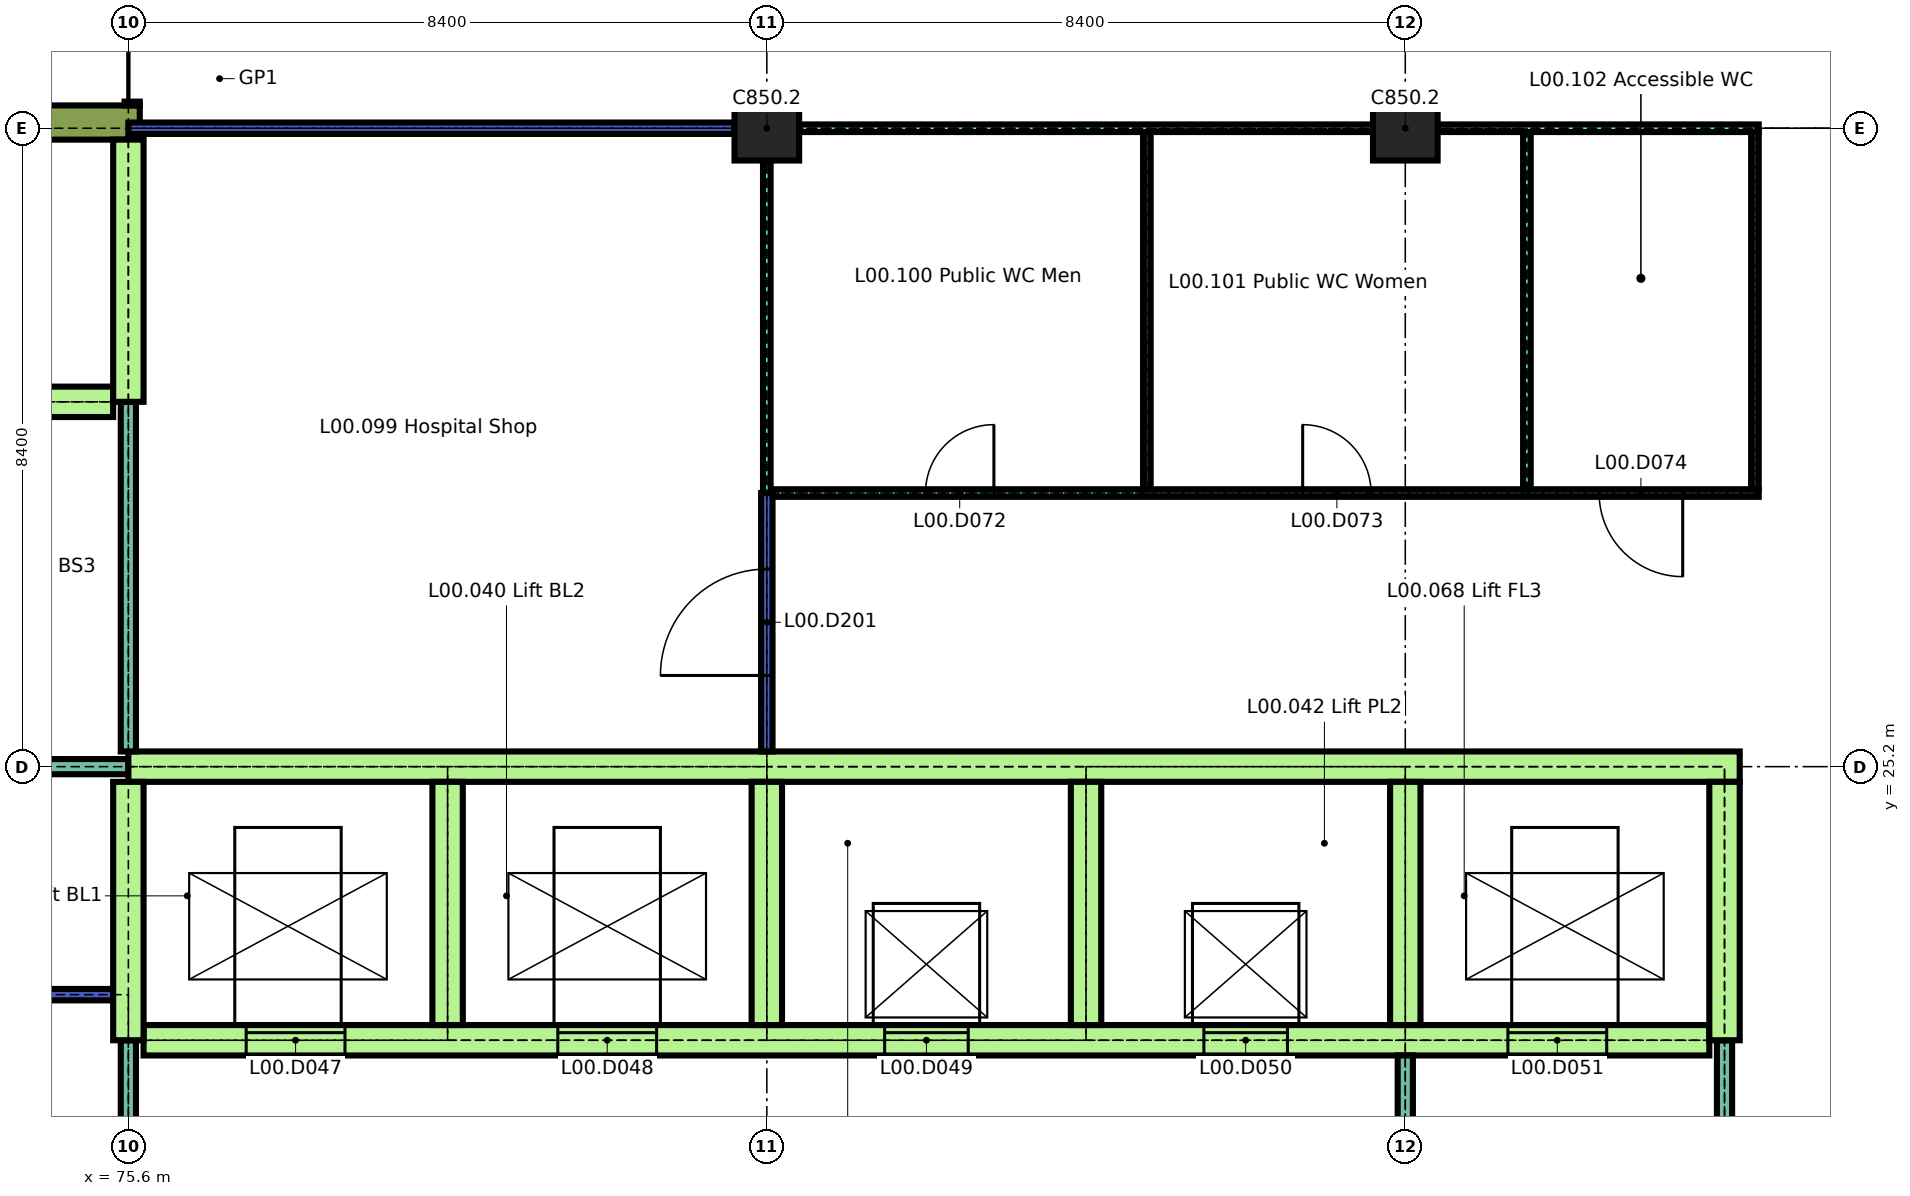
"""IFC4 building model, lengths in metres.
Left out: names, types, materials, properties, quantities, classifications, styles, units other than length and angle.
Written with IfcOpenShell. Run it as: python <this file> out.ifc"""

import sys

from ifc_helpers import new_model, si_unit, direction, frame, frame_2d, origin, origin_2d, place, context, subcontext, project, spatial, rectangle, extrude, element, fill, save


model = new_model("IFC4")
c1 = context("Model", 3, precision=1e-05, world=origin(), true_north=direction((0.0, 1.0)))
c2 = subcontext(c1, "Body", "Model", "MODEL_VIEW")
j1 = project(units=[si_unit("LENGTHUNIT", "METRE"), si_unit("PLANEANGLEUNIT", "RADIAN")], contexts=[c1])
p1 = place(None, origin())
s1 = spatial("IfcSite", under=j1, at=p1, CompositionType="ELEMENT")
p2 = place(p1, origin())
s2 = spatial("IfcBuilding", under=s1, at=p2, CompositionType="ELEMENT")
p3 = place(p2, origin())
s3 = spatial("IfcBuildingStorey", under=s2, at=p3, CompositionType="ELEMENT", Elevation=0.0)
for number, where, z_axis, x_axis in (
    (1, (84.0, 33.6, 0.0), (0.0, 0.0, 1.0), (1.0, 0.0, 0.0)),
    (2, (92.4, 33.6, 0.0), (0.0, 0.0, 1.0), (1.0, 0.0, 0.0)),
):
    element("IfcColumn", number, at=place(p3, frame(where, z_axis=z_axis, x_axis=x_axis)), inside=s3, PredefinedType="COLUMN", context=c2, shape_type="SweptSolid", body=[
        extrude(rectangle(XDim=0.85, YDim=0.85, at=origin_2d()), origin(), (0.0, 0.0, 1.0), 4.14),
    ])
p4 = place(p3, frame((72.3, 33.675, 0.0), z_axis=(0.0, 0.0, 1.0), x_axis=(1.0, 0.0, 0.0)))
e3 = element("IfcWall", 3, at=p4, inside=s3, PredefinedType="SOLIDWALL", context=c2, shape_type="SweptSolid", body=[
    extrude(rectangle(XDim=3.45, YDim=0.45, at=frame_2d((1.725, 0.0))), origin(), (0.0, 0.0, 1.0), 4.14),
])
p5 = place(p3, frame((75.65, 33.9, 0.0), z_axis=(0.0, 0.0, 1.0), x_axis=(0.0, 1.0, 0.0)))
e4 = element("IfcWall", 4, at=p5, inside=s3, PredefinedType="SOLIDWALL", context=c2, shape_type="SweptSolid", body=[
    extrude(rectangle(XDim=0.05, YDim=0.2, at=frame_2d((0.025, 0.0))), origin(), (0.0, 0.0, 1.0), 3.164),
])
p6 = place(p3, frame((75.8, 21.6, 0.0), z_axis=(0.0, 0.0, 1.0), x_axis=(1.0, 0.0, 0.0)))
e5 = element("IfcWall", 5, at=p6, inside=s3, PredefinedType="SHEAR", context=c2, shape_type="SweptSolid", body=[
    extrude(rectangle(XDim=20.6, YDim=0.4, at=frame_2d((10.3, 0.0))), origin(), (0.0, 0.0, 1.0), 4.14),
])
p7 = place(p6, frame((1.35, 0.0, 0.0)))
e6 = element("IfcOpeningElement", 6, at=p7, cuts=e5, PredefinedType="OPENING", context=c2, shape_type="SweptSolid", body=[
    extrude(rectangle(XDim=1.3, YDim=2.1, at=frame_2d((0.65, 1.05))), frame((0.0, 0.21, 0.0), z_axis=(0.0, -1.0, 0.0), x_axis=(1.0, 0.0, 0.0)), (0.0, 0.0, 1.0), 0.42),
])
p8 = place(p6, frame((5.45, 0.0, 0.0)))
e7 = element("IfcOpeningElement", 7, at=p8, cuts=e5, PredefinedType="OPENING", context=c2, shape_type="SweptSolid", body=[
    extrude(rectangle(XDim=1.3, YDim=2.1, at=frame_2d((0.65, 1.05))), frame((0.0, 0.21, 0.0), z_axis=(0.0, -1.0, 0.0), x_axis=(1.0, 0.0, 0.0)), (0.0, 0.0, 1.0), 0.42),
])
p9 = place(p6, frame((9.75, 0.0, 0.0)))
e8 = element("IfcOpeningElement", 8, at=p9, cuts=e5, PredefinedType="OPENING", context=c2, shape_type="SweptSolid", body=[
    extrude(rectangle(XDim=1.1, YDim=2.1, at=frame_2d((0.55, 1.05))), frame((0.0, 0.21, 0.0), z_axis=(0.0, -1.0, 0.0), x_axis=(1.0, 0.0, 0.0)), (0.0, 0.0, 1.0), 0.42),
])
p10 = place(p6, frame((13.95, 0.0, 0.0)))
e9 = element("IfcOpeningElement", 9, at=p10, cuts=e5, PredefinedType="OPENING", context=c2, shape_type="SweptSolid", body=[
    extrude(rectangle(XDim=1.1, YDim=2.1, at=frame_2d((0.55, 1.05))), frame((0.0, 0.21, 0.0), z_axis=(0.0, -1.0, 0.0), x_axis=(1.0, 0.0, 0.0)), (0.0, 0.0, 1.0), 0.42),
])
p11 = place(p6, frame((17.95, 0.0, 0.0)))
e10 = element("IfcOpeningElement", 10, at=p11, cuts=e5, PredefinedType="OPENING", context=c2, shape_type="SweptSolid", body=[
    extrude(rectangle(XDim=1.3, YDim=2.1, at=frame_2d((0.65, 1.05))), frame((0.0, 0.21, 0.0), z_axis=(0.0, -1.0, 0.0), x_axis=(1.0, 0.0, 0.0)), (0.0, 0.0, 1.0), 0.42),
])
p12 = place(p3, frame((63.0, 22.2, 0.0), z_axis=(0.0, 0.0, 1.0), x_axis=(1.0, 0.0, 0.0)))
e11 = element("IfcWall", 11, at=p12, inside=s3, PredefinedType="PARTITIONING", context=c2, shape_type="SweptSolid", body=[
    extrude(rectangle(XDim=12.4, YDim=0.15, at=frame_2d((6.2, 0.0))), origin(), (0.0, 0.0, 1.0), 4.14),
])
p13 = place(p3, frame((67.2, 25.2, 0.0), z_axis=(0.0, 0.0, 1.0), x_axis=(1.0, 0.0, 0.0)))
e12 = element("IfcWall", 12, at=p13, inside=s3, PredefinedType="PARTITIONING", context=c2, shape_type="SweptSolid", body=[
    extrude(rectangle(XDim=8.4, YDim=0.2, at=frame_2d((4.2, 0.0))), origin(), (0.0, 0.0, 1.0), 4.14),
])
p14 = place(p13, frame((3.5, 0.0, 0.0)))
e13 = element("IfcOpeningElement", 13, at=p14, cuts=e12, PredefinedType="OPENING", context=c2, shape_type="SweptSolid", body=[
    extrude(rectangle(XDim=1.4, YDim=2.1, at=frame_2d((0.7, 1.05))), frame((0.0, 0.11, 0.0), z_axis=(0.0, -1.0, 0.0), x_axis=(1.0, 0.0, 0.0)), (0.0, 0.0, 1.0), 0.22),
])
p15 = place(p3, frame((75.6, 25.2, 0.0), z_axis=(0.0, 0.0, 1.0), x_axis=(1.0, 0.0, 0.0)))
e14 = element("IfcWall", 14, at=p15, inside=s3, PredefinedType="SHEAR", context=c2, shape_type="SweptSolid", body=[
    extrude(rectangle(XDim=21.2, YDim=0.4, at=frame_2d((10.6, 0.0))), origin(), (0.0, 0.0, 1.0), 4.14),
])
p16 = place(p3, frame((84.075, 28.8, 0.0), z_axis=(0.0, 0.0, 1.0), x_axis=(1.0, 0.0, 0.0)))
e15 = element("IfcWall", 15, at=p16, inside=s3, PredefinedType="PARTITIONING", context=c2, shape_type="SweptSolid", body=[
    extrude(rectangle(XDim=12.975, YDim=0.1, at=frame_2d((6.488, 0.0))), origin(), (0.0, 0.0, 1.0), 4.14),
])
p17 = place(p16, frame((2.012, 0.0, 0.0)))
e16 = element("IfcOpeningElement", 16, at=p17, cuts=e15, PredefinedType="OPENING", context=c2, shape_type="SweptSolid", body=[
    extrude(rectangle(XDim=0.9, YDim=2.1, at=frame_2d((0.45, 1.05))), frame((0.0, 0.06, 0.0), z_axis=(0.0, -1.0, 0.0), x_axis=(1.0, 0.0, 0.0)), (0.0, 0.0, 1.0), 0.12),
])
p18 = place(p16, frame((6.975, 0.0, 0.0)))
e17 = element("IfcOpeningElement", 17, at=p18, cuts=e15, PredefinedType="OPENING", context=c2, shape_type="SweptSolid", body=[
    extrude(rectangle(XDim=0.9, YDim=2.1, at=frame_2d((0.45, 1.05))), frame((0.0, 0.06, 0.0), z_axis=(0.0, -1.0, 0.0), x_axis=(1.0, 0.0, 0.0)), (0.0, 0.0, 1.0), 0.12),
])
p19 = place(p16, frame((10.875, 0.0, 0.0)))
e18 = element("IfcOpeningElement", 18, at=p19, cuts=e15, PredefinedType="OPENING", context=c2, shape_type="SweptSolid", body=[
    extrude(rectangle(XDim=1.1, YDim=2.1, at=frame_2d((0.55, 1.05))), frame((0.0, 0.06, 0.0), z_axis=(0.0, -1.0, 0.0), x_axis=(1.0, 0.0, 0.0)), (0.0, 0.0, 1.0), 0.12),
])
p20 = place(p3, frame((67.4, 30.0, 0.0), z_axis=(0.0, 0.0, 1.0), x_axis=(1.0, 0.0, 0.0)))
e19 = element("IfcWall", 19, at=p20, inside=s3, PredefinedType="SHEAR", context=c2, shape_type="SweptSolid", body=[
    extrude(rectangle(XDim=8.0, YDim=0.4, at=frame_2d((4.0, 0.0))), origin(), (0.0, 0.0, 1.0), 4.14),
])
p21 = place(p20, frame((0.4, 0.0, 0.0)))
e20 = element("IfcOpeningElement", 20, at=p21, cuts=e19, PredefinedType="OPENING", context=c2, shape_type="SweptSolid", body=[
    extrude(rectangle(XDim=1.2, YDim=2.1, at=frame_2d((0.6, 1.05))), frame((0.0, 0.21, 0.0), z_axis=(0.0, -1.0, 0.0), x_axis=(1.0, 0.0, 0.0)), (0.0, 0.0, 1.0), 0.42),
])
p22 = place(p3, frame((75.6, 33.6, 0.0), z_axis=(0.0, 0.0, 1.0), x_axis=(1.0, 0.0, 0.0)))
e21 = element("IfcWall", 21, at=p22, inside=s3, PredefinedType="PARTITIONING", context=c2, shape_type="SweptSolid", body=[
    extrude(rectangle(XDim=7.975, YDim=0.15, at=frame_2d((3.987, 0.0))), origin(), (0.0, 0.0, 1.0), 4.14),
])
p23 = place(p3, frame((84.425, 33.6, 0.0), z_axis=(0.0, 0.0, 1.0), x_axis=(1.0, 0.0, 0.0)))
e22 = element("IfcWall", 22, at=p23, inside=s3, PredefinedType="PARTITIONING", context=c2, shape_type="SweptSolid", body=[
    extrude(rectangle(XDim=7.55, YDim=0.1, at=frame_2d((3.775, 0.0))), origin(), (0.0, 0.0, 1.0), 4.14),
])
p24 = place(p3, frame((92.825, 33.6, 0.0), z_axis=(0.0, 0.0, 1.0), x_axis=(1.0, 0.0, 0.0)))
e23 = element("IfcWall", 23, at=p24, inside=s3, PredefinedType="PARTITIONING", context=c2, shape_type="SweptSolid", body=[
    extrude(rectangle(XDim=4.225, YDim=0.1, at=frame_2d((2.113, 0.0))), origin(), (0.0, 0.0, 1.0), 4.14),
])
p25 = place(p3, frame((75.6, 16.9, 0.0), z_axis=(0.0, 0.0, 1.0), x_axis=(0.0, 1.0, 0.0)))
e24 = element("IfcWall", 24, at=p25, inside=s3, PredefinedType="PARTITIONING", context=c2, shape_type="SweptSolid", body=[
    extrude(rectangle(XDim=4.7, YDim=0.2, at=frame_2d((2.35, 0.0))), origin(), (0.0, 0.0, 1.0), 4.14),
])
p26 = place(p3, frame((75.6, 21.6, 0.0), z_axis=(0.0, 0.0, 1.0), x_axis=(0.0, 1.0, 0.0)))
e25 = element("IfcWall", 25, at=p26, inside=s3, PredefinedType="SHEAR", context=c2, shape_type="SweptSolid", body=[
    extrude(rectangle(XDim=3.4, YDim=0.4, at=frame_2d((1.7, 0.0))), origin(), (0.0, 0.0, 1.0), 4.14),
])
p27 = place(p3, frame((75.6, 25.4, 0.0), z_axis=(0.0, 0.0, 1.0), x_axis=(0.0, 1.0, 0.0)))
e26 = element("IfcWall", 26, at=p27, inside=s3, PredefinedType="PARTITIONING", context=c2, shape_type="SweptSolid", body=[
    extrude(rectangle(XDim=4.6, YDim=0.2, at=frame_2d((2.3, 0.0))), origin(), (0.0, 0.0, 1.0), 4.14),
])
p28 = place(p3, frame((75.6, 30.0, 0.0), z_axis=(0.0, 0.0, 1.0), x_axis=(0.0, 1.0, 0.0)))
e27 = element("IfcWall", 27, at=p28, inside=s3, PredefinedType="SHEAR", context=c2, shape_type="SweptSolid", body=[
    extrude(rectangle(XDim=3.45, YDim=0.4, at=frame_2d((1.725, 0.0))), origin(), (0.0, 0.0, 1.0), 4.14),
])
for number, where, z_axis, x_axis in (
    (28, (79.8, 21.8, 0.0), (0.0, 0.0, 1.0), (0.0, 1.0, 0.0)),
    (29, (84.0, 21.8, 0.0), (0.0, 0.0, 1.0), (0.0, 1.0, 0.0)),
):
    element("IfcWall", number, at=place(p3, frame(where, z_axis=z_axis, x_axis=x_axis)), inside=s3, PredefinedType="SHEAR", context=c2, shape_type="SweptSolid", body=[
        extrude(rectangle(XDim=3.2, YDim=0.4, at=frame_2d((1.6, 0.0))), origin(), (0.0, 0.0, 1.0), 4.14),
    ])
p29 = place(p3, frame((84.0, 25.4, 0.0), z_axis=(0.0, 0.0, 1.0), x_axis=(0.0, 1.0, 0.0)))
e30 = element("IfcWall", 30, at=p29, inside=s3, PredefinedType="PARTITIONING", context=c2, shape_type="SweptSolid", body=[
    extrude(rectangle(XDim=3.4, YDim=0.15, at=frame_2d((1.7, 0.0))), origin(), (0.0, 0.0, 1.0), 4.14),
])
p30 = place(p29, frame((1.0, 0.0, 0.0)))
e31 = element("IfcOpeningElement", 31, at=p30, cuts=e30, PredefinedType="OPENING", context=c2, shape_type="SweptSolid", body=[
    extrude(rectangle(XDim=1.4, YDim=2.1, at=frame_2d((0.7, 1.05))), frame((0.0, 0.085, 0.0), z_axis=(0.0, -1.0, 0.0), x_axis=(1.0, 0.0, 0.0)), (0.0, 0.0, 1.0), 0.17),
])
p31 = place(p3, frame((84.0, 28.8, 0.0), z_axis=(0.0, 0.0, 1.0), x_axis=(0.0, 1.0, 0.0)))
e32 = element("IfcWall", 32, at=p31, inside=s3, PredefinedType="PARTITIONING", context=c2, shape_type="SweptSolid", body=[
    extrude(rectangle(XDim=4.375, YDim=0.1, at=frame_2d((2.188, 0.0))), origin(), (0.0, 0.0, 1.0), 4.14),
])
p32 = place(p3, frame((88.2, 21.8, 0.0), z_axis=(0.0, 0.0, 1.0), x_axis=(0.0, 1.0, 0.0)))
e33 = element("IfcWall", 33, at=p32, inside=s3, PredefinedType="SHEAR", context=c2, shape_type="SweptSolid", body=[
    extrude(rectangle(XDim=3.2, YDim=0.4, at=frame_2d((1.6, 0.0))), origin(), (0.0, 0.0, 1.0), 4.14),
])
p33 = place(p3, frame((89.0, 28.85, 0.0), z_axis=(0.0, 0.0, 1.0), x_axis=(0.0, 1.0, 0.0)))
e34 = element("IfcWall", 34, at=p33, inside=s3, PredefinedType="PARTITIONING", context=c2, shape_type="SweptSolid", body=[
    extrude(rectangle(XDim=4.7, YDim=0.1, at=frame_2d((2.35, 0.0))), origin(), (0.0, 0.0, 1.0), 4.14),
])
p34 = place(p3, frame((92.4, 16.9, 0.0), z_axis=(0.0, 0.0, 1.0), x_axis=(0.0, 1.0, 0.0)))
e35 = element("IfcWall", 35, at=p34, inside=s3, PredefinedType="PARTITIONING", context=c2, shape_type="SweptSolid", body=[
    extrude(rectangle(XDim=4.5, YDim=0.2, at=frame_2d((2.25, 0.0))), origin(), (0.0, 0.0, 1.0), 4.14),
])
p35 = place(p34, frame((1.4, 0.0, 0.0)))
e36 = element("IfcOpeningElement", 36, at=p35, cuts=e35, PredefinedType="OPENING", context=c2, shape_type="SweptSolid", body=[
    extrude(rectangle(XDim=1.7, YDim=2.4, at=frame_2d((0.85, 1.2))), frame((0.0, 0.11, 0.0), z_axis=(0.0, -1.0, 0.0), x_axis=(1.0, 0.0, 0.0)), (0.0, 0.0, 1.0), 0.22),
])
p36 = place(p3, frame((92.4, 21.8, 0.0), z_axis=(0.0, 0.0, 1.0), x_axis=(0.0, 1.0, 0.0)))
e37 = element("IfcWall", 37, at=p36, inside=s3, PredefinedType="SHEAR", context=c2, shape_type="SweptSolid", body=[
    extrude(rectangle(XDim=3.2, YDim=0.4, at=frame_2d((1.6, 0.0))), origin(), (0.0, 0.0, 1.0), 4.14),
])
p37 = place(p3, frame((94.0, 28.85, 0.0), z_axis=(0.0, 0.0, 1.0), x_axis=(0.0, 1.0, 0.0)))
e38 = element("IfcWall", 38, at=p37, inside=s3, PredefinedType="PARTITIONING", context=c2, shape_type="SweptSolid", body=[
    extrude(rectangle(XDim=4.7, YDim=0.1, at=frame_2d((2.35, 0.0))), origin(), (0.0, 0.0, 1.0), 4.14),
])
p38 = place(p3, frame((96.6, 16.9, 0.0), z_axis=(0.0, 0.0, 1.0), x_axis=(0.0, 1.0, 0.0)))
e39 = element("IfcWall", 39, at=p38, inside=s3, PredefinedType="PARTITIONING", context=c2, shape_type="SweptSolid", body=[
    extrude(rectangle(XDim=4.7, YDim=0.2, at=frame_2d((2.35, 0.0))), origin(), (0.0, 0.0, 1.0), 4.14),
])
p39 = place(p3, frame((96.6, 21.6, 0.0), z_axis=(0.0, 0.0, 1.0), x_axis=(0.0, 1.0, 0.0)))
e40 = element("IfcWall", 40, at=p39, inside=s3, PredefinedType="SHEAR", context=c2, shape_type="SweptSolid", body=[
    extrude(rectangle(XDim=3.4, YDim=0.4, at=frame_2d((1.7, 0.0))), origin(), (0.0, 0.0, 1.0), 4.14),
])
p40 = place(p3, frame((97.0, 28.85, 0.0), z_axis=(0.0, 0.0, 1.0), x_axis=(0.0, 1.0, 0.0)))
e41 = element("IfcWall", 41, at=p40, inside=s3, PredefinedType="PARTITIONING", context=c2, shape_type="SweptSolid", body=[
    extrude(rectangle(XDim=4.7, YDim=0.1, at=frame_2d((2.35, 0.0))), origin(), (0.0, 0.0, 1.0), 4.14),
])
p41 = place(p7, origin())
e42 = element("IfcDoor", 42, at=p41, inside=s3, OperationType="SLIDING_TO_LEFT", PredefinedType="DOOR", context=c2, shape_type="SweptSolid", body=[
    extrude(rectangle(XDim=1.3, YDim=2.1, at=frame_2d((0.65, 1.05))), frame((0.0, 0.025, 0.0), z_axis=(0.0, -1.0, 0.0), x_axis=(1.0, 0.0, 0.0)), (0.0, 0.0, 1.0), 0.05),
])
fill(e6, e42)
p42 = place(p8, origin())
e43 = element("IfcDoor", 43, at=p42, inside=s3, OperationType="SLIDING_TO_LEFT", PredefinedType="DOOR", context=c2, shape_type="SweptSolid", body=[
    extrude(rectangle(XDim=1.3, YDim=2.1, at=frame_2d((0.65, 1.05))), frame((0.0, 0.025, 0.0), z_axis=(0.0, -1.0, 0.0), x_axis=(1.0, 0.0, 0.0)), (0.0, 0.0, 1.0), 0.05),
])
fill(e7, e43)
p43 = place(p9, origin())
e44 = element("IfcDoor", 44, at=p43, inside=s3, OperationType="SLIDING_TO_LEFT", PredefinedType="DOOR", context=c2, shape_type="SweptSolid", body=[
    extrude(rectangle(XDim=1.1, YDim=2.1, at=frame_2d((0.55, 1.05))), frame((0.0, 0.025, 0.0), z_axis=(0.0, -1.0, 0.0), x_axis=(1.0, 0.0, 0.0)), (0.0, 0.0, 1.0), 0.05),
])
fill(e8, e44)
p44 = place(p10, origin())
e45 = element("IfcDoor", 45, at=p44, inside=s3, OperationType="SLIDING_TO_LEFT", PredefinedType="DOOR", context=c2, shape_type="SweptSolid", body=[
    extrude(rectangle(XDim=1.1, YDim=2.1, at=frame_2d((0.55, 1.05))), frame((0.0, 0.025, 0.0), z_axis=(0.0, -1.0, 0.0), x_axis=(1.0, 0.0, 0.0)), (0.0, 0.0, 1.0), 0.05),
])
fill(e9, e45)
p45 = place(p11, origin())
e46 = element("IfcDoor", 46, at=p45, inside=s3, OperationType="SLIDING_TO_LEFT", PredefinedType="DOOR", context=c2, shape_type="SweptSolid", body=[
    extrude(rectangle(XDim=1.3, YDim=2.1, at=frame_2d((0.65, 1.05))), frame((0.0, 0.025, 0.0), z_axis=(0.0, -1.0, 0.0), x_axis=(1.0, 0.0, 0.0)), (0.0, 0.0, 1.0), 0.05),
])
fill(e10, e46)
p46 = place(p17, origin())
e47 = element("IfcDoor", 47, at=p46, inside=s3, OperationType="SINGLE_SWING_LEFT", PredefinedType="DOOR", context=c2, shape_type="SweptSolid", body=[
    extrude(rectangle(XDim=0.9, YDim=2.1, at=frame_2d((0.45, 1.05))), frame((0.0, 0.02, 0.0), z_axis=(0.0, -1.0, 0.0), x_axis=(1.0, 0.0, 0.0)), (0.0, 0.0, 1.0), 0.04),
])
fill(e16, e47)
p47 = place(p18, origin())
e48 = element("IfcDoor", 48, at=p47, inside=s3, OperationType="SINGLE_SWING_RIGHT", PredefinedType="DOOR", context=c2, shape_type="SweptSolid", body=[
    extrude(rectangle(XDim=0.9, YDim=2.1, at=frame_2d((0.45, 1.05))), frame((0.0, 0.02, 0.0), z_axis=(0.0, -1.0, 0.0), x_axis=(1.0, 0.0, 0.0)), (0.0, 0.0, 1.0), 0.04),
])
fill(e17, e48)
p48 = place(p19, origin())
e49 = element("IfcDoor", 49, at=p48, inside=s3, OperationType="SINGLE_SWING_RIGHT", PredefinedType="DOOR", context=c2, shape_type="SweptSolid", body=[
    extrude(rectangle(XDim=1.1, YDim=2.1, at=frame_2d((0.55, 1.05))), frame((0.0, 0.025, 0.0), z_axis=(0.0, -1.0, 0.0), x_axis=(1.0, 0.0, 0.0)), (0.0, 0.0, 1.0), 0.05),
])
fill(e18, e49)
p49 = place(p30, origin())
e50 = element("IfcDoor", 50, at=p49, inside=s3, OperationType="SINGLE_SWING_RIGHT", PredefinedType="DOOR", context=c2, shape_type="SweptSolid", body=[
    extrude(rectangle(XDim=1.4, YDim=2.1, at=frame_2d((0.7, 1.05))), frame((0.0, 0.025, 0.0), z_axis=(0.0, -1.0, 0.0), x_axis=(1.0, 0.0, 0.0)), (0.0, 0.0, 1.0), 0.05),
])
fill(e31, e50)
save(model, sys.argv[1])
